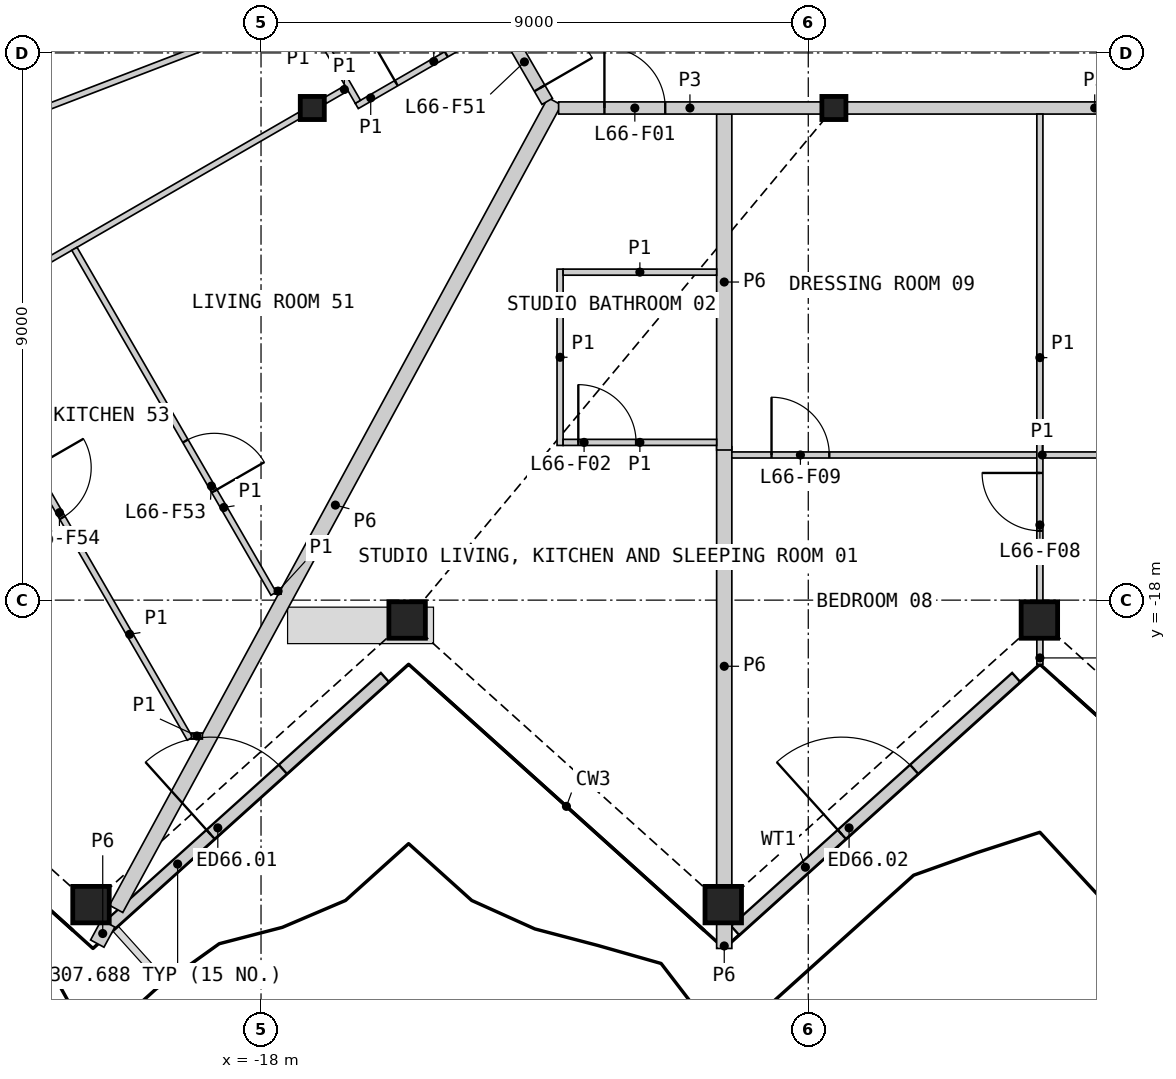
"""IFC4 building model, lengths in metres.
Left out: names, types, materials, properties, quantities, classifications, styles, units other than length and angle.
Written with IfcOpenShell. Run it as: python <this file> out.ifc"""

import sys

from ifc_helpers import new_model, si_unit, direction, frame, frame_2d, origin, origin_2d, place, context, subcontext, project, spatial, rectangle, hollow_rectangle, i_section, extrude, element, fill, save


model = new_model("IFC4")
c1 = context("Model", 3, precision=1e-05, world=origin(), true_north=direction((0.0, 1.0)))
c2 = subcontext(c1, "Body", "Model", "MODEL_VIEW")
j1 = project(units=[si_unit("LENGTHUNIT", "METRE"), si_unit("PLANEANGLEUNIT", "RADIAN")], contexts=[c1])
p1 = place(None, origin())
s1 = spatial("IfcSite", under=j1, at=p1, CompositionType="ELEMENT")
p2 = place(p1, origin())
s2 = spatial("IfcBuilding", under=s1, at=p2, CompositionType="ELEMENT")
p3 = place(p2, frame((0.0, 0.0, 305.2)))
s3 = spatial("IfcBuildingStorey", under=s2, at=p3, CompositionType="ELEMENT", Elevation=305.2)
for number, where, z_axis, x_axis in (
    (1, (-20.796, -23.008, 0.0), (0.0, 0.0, 1.0), (1.0, 0.0, 0.0)),
    (2, (-15.597, -18.327, 0.0), (0.0, 0.0, 1.0), (1.0, 0.0, 0.0)),
    (3, (-10.398, -23.008, 0.0), (0.0, 0.0, 1.0), (1.0, 0.0, 0.0)),
    (4, (-5.199, -18.327, 0.0), (0.0, 0.0, 1.0), (1.0, 0.0, 0.0)),
):
    element("IfcColumn", number, at=place(p3, frame(where, z_axis=z_axis, x_axis=x_axis)), inside=s3, PredefinedType="COLUMN", context=c2, shape_type="SweptSolid", body=[
        extrude(hollow_rectangle(XDim=0.6, YDim=0.6, WallThickness=0.04, at=origin_2d()), origin(), (0.0, 0.0, 1.0), 3.4),
    ])
for number, where, z_axis, x_axis in (
    (5, (-17.157, -9.906, 0.0), (0.0, 0.0, 1.0), (1.0, 0.0, 0.0)),
    (6, (-8.578, -9.906, 0.0), (0.0, 0.0, 1.0), (1.0, 0.0, 0.0)),
):
    element("IfcColumn", number, at=place(p3, frame(where, z_axis=z_axis, x_axis=x_axis)), inside=s3, PredefinedType="COLUMN", context=c2, shape_type="SweptSolid", body=[
        extrude(i_section(OverallWidth=0.396, OverallDepth=0.381, WebThickness=0.019, FlangeThickness=0.03, at=origin_2d()), origin(), (0.0, 0.0, 1.0), 3.4),
    ])
p4 = place(p3, frame((-20.508, -23.364, 0.0), z_axis=(0.0, 0.0, 1.0), x_axis=(0.743135364919, 0.669141113224, 0.0)))
e7 = element("IfcWall", 7, at=p4, inside=s3, PredefinedType="SOLIDWALL", context=c2, shape_type="SweptSolid", body=[
    extrude(rectangle(XDim=6.117, YDim=0.2, at=frame_2d((3.059, 0.0))), origin(), (0.0, 0.0, 1.0), 2.488),
])
p5 = place(p4, frame((2.259, 0.0, 0.0)))
e8 = element("IfcOpeningElement", 8, at=p5, cuts=e7, PredefinedType="OPENING", context=c2, shape_type="SweptSolid", body=[
    extrude(rectangle(XDim=1.6, YDim=2.25, at=frame_2d((0.8, 1.125))), frame((0.0, 0.11, 0.0), z_axis=(0.0, -1.0, 0.0), x_axis=(1.0, 0.0, 0.0)), (0.0, 0.0, 1.0), 0.22),
])
p6 = place(p3, frame((-10.203, -23.434, 0.0), z_axis=(0.0, 0.0, 1.0), x_axis=(0.74314582041, 0.669129501373, 0.0)))
e9 = element("IfcWall", 9, at=p6, inside=s3, PredefinedType="SOLIDWALL", context=c2, shape_type="SweptSolid", body=[
    extrude(rectangle(XDim=6.221, YDim=0.2, at=frame_2d((3.11, 0.0))), origin(), (0.0, 0.0, 1.0), 2.488),
])
p7 = place(p6, frame((2.362, 0.0, 0.0)))
e10 = element("IfcOpeningElement", 10, at=p7, cuts=e9, PredefinedType="OPENING", context=c2, shape_type="SweptSolid", body=[
    extrude(rectangle(XDim=1.6, YDim=2.25, at=frame_2d((0.8, 1.125))), frame((0.0, 0.11, 0.0), z_axis=(0.0, -1.0, 0.0), x_axis=(1.0, 0.0, 0.0)), (0.0, 0.0, 1.0), 0.22),
])
p8 = place(p3, frame((-20.383, -23.078, 0.0), z_axis=(0.0, 0.0, 1.0), x_axis=(0.477177412766, 0.878806984921, 0.0)))
e11 = element("IfcWall", 11, at=p8, inside=s3, PredefinedType="PARTITIONING", context=c2, shape_type="SweptSolid", body=[
    extrude(rectangle(XDim=15.114, YDim=0.25, at=frame_2d((7.557, 0.0))), origin(), (0.0, 0.0, 1.0), 2.33),
])
p9 = place(p3, frame((-8.371, -9.906, 0.0), z_axis=(0.0, 0.0, 1.0), x_axis=(1.0, 0.0, 0.0)))
e12 = element("IfcWall", 12, at=p9, inside=s3, PredefinedType="PARTITIONING", context=c2, shape_type="SweptSolid", body=[
    extrude(rectangle(XDim=8.163, YDim=0.2, at=frame_2d((4.082, 0.0))), origin(), (0.0, 0.0, 1.0), 3.1),
])
p10 = place(p3, frame((-10.382, -22.698, 0.0), z_axis=(0.0, 0.0, 1.0), x_axis=(0.0, 1.0, 0.0)))
e13 = element("IfcWall", 13, at=p10, inside=s3, PredefinedType="PARTITIONING", context=c2, shape_type="SweptSolid", body=[
    extrude(rectangle(XDim=7.22, YDim=0.25, at=frame_2d((3.61, 0.0))), origin(), (0.0, 0.0, 1.0), 2.33),
])
p11 = place(p3, frame((-10.382, -15.531, 0.0), z_axis=(0.0, 0.0, 1.0), x_axis=(0.0, 1.0, 0.0)))
e14 = element("IfcWall", 14, at=p11, inside=s3, PredefinedType="PARTITIONING", context=c2, shape_type="SweptSolid", body=[
    extrude(rectangle(XDim=5.525, YDim=0.25, at=frame_2d((2.762, 0.0))), origin(), (0.0, 0.0, 1.0), 2.33),
])
p12 = place(p3, frame((-13.106, -9.906, 0.0), z_axis=(0.0, 0.0, 1.0), x_axis=(1.0, 0.0, 0.0)))
e15 = element("IfcWall", 15, at=p12, inside=s3, PredefinedType="PARTITIONING", context=c2, shape_type="SweptSolid", body=[
    extrude(rectangle(XDim=4.32, YDim=0.2, at=frame_2d((2.16, 0.0))), origin(), (0.0, 0.0, 1.0), 3.1),
])
p13 = place(p12, frame((0.753, 0.0, 0.0)))
e16 = element("IfcOpeningElement", 16, at=p13, cuts=e15, PredefinedType="OPENING", context=c2, shape_type="SweptSolid", body=[
    extrude(rectangle(XDim=1.0, YDim=2.1, at=frame_2d((0.5, 1.05))), frame((0.0, 0.11, 0.0), z_axis=(0.0, -1.0, 0.0), x_axis=(1.0, 0.0, 0.0)), (0.0, 0.0, 1.0), 0.22),
])
p14 = place(p3, frame((-15.131, -6.614, 0.0), z_axis=(0.0, 0.0, 1.0), x_axis=(0.499967746641, -0.866044024469, 0.0)))
e17 = element("IfcWall", 17, at=p14, inside=s3, PredefinedType="PARTITIONING", context=c2, shape_type="SweptSolid", body=[
    extrude(rectangle(XDim=3.676, YDim=0.2, at=frame_2d((1.838, 0.0))), origin(), (0.0, 0.0, 1.0), 3.1),
])
p15 = place(p14, frame((2.426, 0.0, 0.0)))
e18 = element("IfcOpeningElement", 18, at=p15, cuts=e17, PredefinedType="OPENING", context=c2, shape_type="SweptSolid", body=[
    extrude(rectangle(XDim=1.0, YDim=2.1, at=frame_2d((0.5, 1.05))), frame((0.0, 0.11, 0.0), z_axis=(0.0, -1.0, 0.0), x_axis=(1.0, 0.0, 0.0)), (0.0, 0.0, 1.0), 0.22),
])
p16 = place(p3, frame((-10.382, -23.729, 0.0), z_axis=(0.0, 0.0, 1.0), x_axis=(0.0, 1.0, 0.0)))
e19 = element("IfcWall", 19, at=p16, inside=s3, PredefinedType="PARTITIONING", context=c2, shape_type="SweptSolid", body=[
    extrude(rectangle(XDim=0.411, YDim=0.25, at=frame_2d((0.206, 0.0))), origin(), (0.0, 0.0, 1.0), 2.33),
])
p17 = place(p3, frame((-20.693, -23.649, 0.0), z_axis=(0.0, 0.0, 1.0), x_axis=(0.477077538769, 0.878861207474, 0.0)))
e20 = element("IfcWall", 20, at=p17, inside=s3, PredefinedType="PARTITIONING", context=c2, shape_type="SweptSolid", body=[
    extrude(rectangle(XDim=0.376, YDim=0.25, at=frame_2d((0.188, 0.0))), origin(), (0.0, 0.0, 1.0), 2.33),
])
p18 = place(p3, frame((-29.479, -12.95, 0.0), z_axis=(0.0, 0.0, 1.0), x_axis=(0.933581523131, 0.358365092703, 0.0)))
e21 = element("IfcWall", 21, at=p18, inside=s3, PredefinedType="PARTITIONING", context=c2, shape_type="SweptSolid", body=[
    extrude(rectangle(XDim=13.005, YDim=0.1, at=frame_2d((6.502, 0.0))), origin(), (0.0, 0.0, 1.0), 2.33),
])
p19 = place(p18, frame((4.771, 0.0, 0.0)))
e22 = element("IfcOpeningElement", 22, at=p19, cuts=e21, PredefinedType="OPENING", context=c2, shape_type="SweptSolid", body=[
    extrude(rectangle(XDim=0.95, YDim=2.1, at=frame_2d((0.475, 1.05))), frame((0.0, 0.06, 0.0), z_axis=(0.0, -1.0, 0.0), x_axis=(1.0, 0.0, 0.0)), (0.0, 0.0, 1.0), 0.12),
])
p20 = place(p3, frame((-27.122, -15.659, 0.0), z_axis=(0.0, 0.0, 1.0), x_axis=(0.866021046153, 0.500007547564, 0.0)))
e23 = element("IfcWall", 23, at=p20, inside=s3, PredefinedType="PARTITIONING", context=c2, shape_type="SweptSolid", body=[
    extrude(rectangle(XDim=11.267, YDim=0.1, at=frame_2d((5.634, 0.0))), origin(), (0.0, 0.0, 1.0), 2.33),
])
p21 = place(p20, frame((1.452, 0.0, 0.0)))
e24 = element("IfcOpeningElement", 24, at=p21, cuts=e23, PredefinedType="OPENING", context=c2, shape_type="SweptSolid", body=[
    extrude(rectangle(XDim=0.95, YDim=2.1, at=frame_2d((0.475, 1.05))), frame((0.0, 0.06, 0.0), z_axis=(0.0, -1.0, 0.0), x_axis=(1.0, 0.0, 0.0)), (0.0, 0.0, 1.0), 0.12),
])
p22 = place(p3, frame((-10.257, -15.613, 0.0), z_axis=(0.0, 0.0, 1.0), x_axis=(1.0, 0.0, 0.0)))
e25 = element("IfcWall", 25, at=p22, inside=s3, PredefinedType="PARTITIONING", context=c2, shape_type="SweptSolid", body=[
    extrude(rectangle(XDim=10.207, YDim=0.1, at=frame_2d((5.104, 0.0))), origin(), (0.0, 0.0, 1.0), 2.33),
])
p23 = place(p22, frame((8.403, 0.0, 0.0)))
e26 = element("IfcOpeningElement", 26, at=p23, cuts=e25, PredefinedType="OPENING", context=c2, shape_type="SweptSolid", body=[
    extrude(rectangle(XDim=0.95, YDim=2.1, at=frame_2d((0.475, 1.05))), frame((0.0, 0.06, 0.0), z_axis=(0.0, -1.0, 0.0), x_axis=(1.0, 0.0, 0.0)), (0.0, 0.0, 1.0), 0.12),
])
p24 = place(p22, frame((0.653, 0.0, 0.0)))
e27 = element("IfcOpeningElement", 27, at=p24, cuts=e25, PredefinedType="OPENING", context=c2, shape_type="SweptSolid", body=[
    extrude(rectangle(XDim=0.95, YDim=2.1, at=frame_2d((0.475, 1.05))), frame((0.0, 0.06, 0.0), z_axis=(0.0, -1.0, 0.0), x_axis=(1.0, 0.0, 0.0)), (0.0, 0.0, 1.0), 0.12),
])
p25 = place(p3, frame((-5.191, -18.017, 0.0), z_axis=(0.0, 0.0, 1.0), x_axis=(0.0, 1.0, 0.0)))
e28 = element("IfcWall", 28, at=p25, inside=s3, PredefinedType="PARTITIONING", context=c2, shape_type="SweptSolid", body=[
    extrude(rectangle(XDim=8.011, YDim=0.1, at=frame_2d((4.006, 0.0))), origin(), (0.0, 0.0, 1.0), 2.33),
])
p26 = place(p25, frame((1.158, 0.0, 0.0)))
e29 = element("IfcOpeningElement", 29, at=p26, cuts=e28, PredefinedType="OPENING", context=c2, shape_type="SweptSolid", body=[
    extrude(rectangle(XDim=0.95, YDim=2.1, at=frame_2d((0.475, 1.05))), frame((0.0, 0.06, 0.0), z_axis=(0.0, -1.0, 0.0), x_axis=(1.0, 0.0, 0.0)), (0.0, 0.0, 1.0), 0.12),
])
p27 = place(p3, frame((-23.133, -13.414, 0.0), z_axis=(0.0, 0.0, 1.0), x_axis=(0.500014841469, -0.866016834889, 0.0)))
e30 = element("IfcWall", 30, at=p27, inside=s3, PredefinedType="PARTITIONING", context=c2, shape_type="SweptSolid", body=[
    extrude(rectangle(XDim=7.927, YDim=0.1, at=frame_2d((3.963, 0.0))), origin(), (0.0, 0.0, 1.0), 2.33),
])
p28 = place(p27, frame((2.78, 0.0, 0.0)))
e31 = element("IfcOpeningElement", 31, at=p28, cuts=e30, PredefinedType="OPENING", context=c2, shape_type="SweptSolid", body=[
    extrude(rectangle(XDim=0.95, YDim=2.1, at=frame_2d((0.475, 1.05))), frame((0.0, 0.06, 0.0), z_axis=(0.0, -1.0, 0.0), x_axis=(1.0, 0.0, 0.0)), (0.0, 0.0, 1.0), 0.12),
])
p29 = place(p3, frame((-21.069, -12.222, 0.0), z_axis=(0.0, 0.0, 1.0), x_axis=(0.499991310556, -0.866030420579, 0.0)))
e32 = element("IfcWall", 32, at=p29, inside=s3, PredefinedType="PARTITIONING", context=c2, shape_type="SweptSolid", body=[
    extrude(rectangle(XDim=6.55, YDim=0.1, at=frame_2d((3.275, 0.0))), origin(), (0.0, 0.0, 1.0), 2.33),
])
p30 = place(p29, frame((3.65, 0.0, 0.0)))
e33 = element("IfcOpeningElement", 33, at=p30, cuts=e32, PredefinedType="OPENING", context=c2, shape_type="SweptSolid", body=[
    extrude(rectangle(XDim=0.95, YDim=2.1, at=frame_2d((0.475, 1.05))), frame((0.0, 0.06, 0.0), z_axis=(0.0, -1.0, 0.0), x_axis=(1.0, 0.0, 0.0)), (0.0, 0.0, 1.0), 0.12),
])
p31 = place(p3, frame((-13.082, -15.456, 0.0), z_axis=(0.0, 0.0, 1.0), x_axis=(0.0, 1.0, 0.0)))
e34 = element("IfcWall", 34, at=p31, inside=s3, PredefinedType="PARTITIONING", context=c2, shape_type="SweptSolid", body=[
    extrude(rectangle(XDim=2.9, YDim=0.1, at=frame_2d((1.45, 0.0))), origin(), (0.0, 0.0, 1.0), 2.33),
])
p32 = place(p3, frame((-16.426, -9.872, 0.0), z_axis=(0.0, 0.0, 1.0), x_axis=(0.866029095148, 0.499993606316, 0.0)))
e35 = element("IfcWall", 35, at=p32, inside=s3, PredefinedType="PARTITIONING", context=c2, shape_type="SweptSolid", body=[
    extrude(rectangle(XDim=2.65, YDim=0.1, at=frame_2d((1.325, 0.0))), origin(), (0.0, 0.0, 1.0), 2.33),
])
p33 = place(p32, frame((0.75, 0.0, 0.0)))
e36 = element("IfcOpeningElement", 36, at=p33, cuts=e35, PredefinedType="OPENING", context=c2, shape_type="SweptSolid", body=[
    extrude(rectangle(XDim=0.95, YDim=2.1, at=frame_2d((0.475, 1.05))), frame((0.0, 0.06, 0.0), z_axis=(0.0, -1.0, 0.0), x_axis=(1.0, 0.0, 0.0)), (0.0, 0.0, 1.0), 0.12),
])
p34 = place(p3, frame((-13.032, -12.606, 0.0), z_axis=(0.0, 0.0, 1.0), x_axis=(1.0, 0.0, 0.0)))
e37 = element("IfcWall", 37, at=p34, inside=s3, PredefinedType="PARTITIONING", context=c2, shape_type="SweptSolid", body=[
    extrude(rectangle(XDim=2.525, YDim=0.1, at=frame_2d((1.263, 0.0))), origin(), (0.0, 0.0, 1.0), 2.33),
])
p35 = place(p3, frame((-13.032, -15.406, 0.0), z_axis=(0.0, 0.0, 1.0), x_axis=(1.0, 0.0, 0.0)))
e38 = element("IfcWall", 38, at=p35, inside=s3, PredefinedType="PARTITIONING", context=c2, shape_type="SweptSolid", body=[
    extrude(rectangle(XDim=2.525, YDim=0.1, at=frame_2d((1.263, 0.0))), origin(), (0.0, 0.0, 1.0), 2.33),
])
p36 = place(p35, frame((0.25, 0.0, 0.0)))
e39 = element("IfcOpeningElement", 39, at=p36, cuts=e38, PredefinedType="OPENING", context=c2, shape_type="SweptSolid", body=[
    extrude(rectangle(XDim=0.95, YDim=2.1, at=frame_2d((0.475, 1.05))), frame((0.0, 0.06, 0.0), z_axis=(0.0, -1.0, 0.0), x_axis=(1.0, 0.0, 0.0)), (0.0, 0.0, 1.0), 0.12),
])
p37 = place(p3, frame((-17.507, -7.899, 0.0), z_axis=(0.0, 0.0, 1.0), x_axis=(0.499946605688, -0.86605622881, 0.0)))
e40 = element("IfcWall", 40, at=p37, inside=s3, PredefinedType="PARTITIONING", context=c2, shape_type="SweptSolid", body=[
    extrude(rectangle(XDim=2.2, YDim=0.1, at=frame_2d((1.1, 0.0))), origin(), (0.0, 0.0, 1.0), 2.33),
])
p38 = place(p3, frame((-16.949, -9.786, 0.0), z_axis=(0.0, 0.0, 1.0), x_axis=(0.866036909293, 0.499980071345, 0.0)))
e41 = element("IfcWall", 41, at=p38, inside=s3, PredefinedType="PARTITIONING", context=c2, shape_type="SweptSolid", body=[
    extrude(rectangle(XDim=0.41, YDim=0.1, at=frame_2d((0.205, 0.0))), origin(), (0.0, 0.0, 1.0), 2.33),
])
p39 = place(p3, frame((-5.191, -19.055, 0.0), z_axis=(0.0, 0.0, 1.0), x_axis=(0.0, 1.0, 0.0)))
e42 = element("IfcWall", 42, at=p39, inside=s3, PredefinedType="PARTITIONING", context=c2, shape_type="SweptSolid", body=[
    extrude(rectangle(XDim=0.418, YDim=0.1, at=frame_2d((0.209, 0.0))), origin(), (0.0, 0.0, 1.0), 2.33),
])
p40 = place(p3, frame((-19.145, -20.235, 0.0), z_axis=(0.0, 0.0, 1.0), x_axis=(1.0, 0.0, 0.0)))
e43 = element("IfcWall", 43, at=p40, inside=s3, PredefinedType="PARTITIONING", context=c2, shape_type="SweptSolid", body=[
    extrude(rectangle(XDim=0.18, YDim=0.1, at=frame_2d((0.09, 0.0))), origin(), (0.0, 0.0, 1.0), 2.33),
])
p41 = place(p3, frame((-17.769, -17.852, 0.0), z_axis=(0.0, 0.0, 1.0), x_axis=(1.0, 0.0, 0.0)))
e44 = element("IfcWall", 44, at=p41, inside=s3, PredefinedType="PARTITIONING", context=c2, shape_type="SweptSolid", body=[
    extrude(rectangle(XDim=0.098, YDim=0.1, at=frame_2d((0.049, 0.0))), origin(), (0.0, 0.0, 1.0), 2.33),
])
p42 = place(p5, origin())
e45 = element("IfcDoor", 45, at=p42, inside=s3, OperationType="DOUBLE_DOOR_SINGLE_SWING", PredefinedType="DOOR", context=c2, shape_type="SweptSolid", body=[
    extrude(rectangle(XDim=1.6, YDim=2.25, at=frame_2d((0.8, 1.125))), frame((0.0, 0.025, 0.0), z_axis=(0.0, -1.0, 0.0), x_axis=(1.0, 0.0, 0.0)), (0.0, 0.0, 1.0), 0.05),
])
fill(e8, e45)
p43 = place(p7, origin())
e46 = element("IfcDoor", 46, at=p43, inside=s3, OperationType="DOUBLE_DOOR_SINGLE_SWING", PredefinedType="DOOR", context=c2, shape_type="SweptSolid", body=[
    extrude(rectangle(XDim=1.6, YDim=2.25, at=frame_2d((0.8, 1.125))), frame((0.0, 0.025, 0.0), z_axis=(0.0, -1.0, 0.0), x_axis=(1.0, 0.0, 0.0)), (0.0, 0.0, 1.0), 0.05),
])
fill(e10, e46)
p44 = place(p13, origin())
e47 = element("IfcDoor", 47, at=p44, inside=s3, OperationType="SINGLE_SWING_LEFT", PredefinedType="DOOR", context=c2, shape_type="SweptSolid", body=[
    extrude(rectangle(XDim=1.0, YDim=2.1, at=frame_2d((0.5, 1.05))), frame((0.0, 0.025, 0.0), z_axis=(0.0, -1.0, 0.0), x_axis=(1.0, 0.0, 0.0)), (0.0, 0.0, 1.0), 0.05),
])
fill(e16, e47)
p45 = place(p36, origin())
e48 = element("IfcDoor", 48, at=p45, inside=s3, OperationType="SINGLE_SWING_LEFT", PredefinedType="DOOR", context=c2, shape_type="SweptSolid", body=[
    extrude(rectangle(XDim=0.95, YDim=2.1, at=frame_2d((0.475, 1.05))), frame((0.0, 0.025, 0.0), z_axis=(0.0, -1.0, 0.0), x_axis=(1.0, 0.0, 0.0)), (0.0, 0.0, 1.0), 0.05),
])
fill(e39, e48)
p46 = place(p26, origin())
e49 = element("IfcDoor", 49, at=p46, inside=s3, OperationType="SINGLE_SWING_RIGHT", PredefinedType="DOOR", context=c2, shape_type="SweptSolid", body=[
    extrude(rectangle(XDim=0.95, YDim=2.1, at=frame_2d((0.475, 1.05))), frame((0.0, 0.025, 0.0), z_axis=(0.0, -1.0, 0.0), x_axis=(1.0, 0.0, 0.0)), (0.0, 0.0, 1.0), 0.05),
])
fill(e29, e49)
p47 = place(p24, origin())
e50 = element("IfcDoor", 50, at=p47, inside=s3, OperationType="SINGLE_SWING_LEFT", PredefinedType="DOOR", context=c2, shape_type="SweptSolid", body=[
    extrude(rectangle(XDim=0.95, YDim=2.1, at=frame_2d((0.475, 1.05))), frame((0.0, 0.025, 0.0), z_axis=(0.0, -1.0, 0.0), x_axis=(1.0, 0.0, 0.0)), (0.0, 0.0, 1.0), 0.05),
])
fill(e27, e50)
p48 = place(p15, origin())
e51 = element("IfcDoor", 51, at=p48, inside=s3, OperationType="SINGLE_SWING_RIGHT", PredefinedType="DOOR", context=c2, shape_type="SweptSolid", body=[
    extrude(rectangle(XDim=1.0, YDim=2.1, at=frame_2d((0.5, 1.05))), frame((0.0, 0.025, 0.0), z_axis=(0.0, -1.0, 0.0), x_axis=(1.0, 0.0, 0.0)), (0.0, 0.0, 1.0), 0.05),
])
fill(e18, e51)
p49 = place(p33, origin())
e52 = element("IfcDoor", 52, at=p49, inside=s3, OperationType="SINGLE_SWING_LEFT", PredefinedType="DOOR", context=c2, shape_type="SweptSolid", body=[
    extrude(rectangle(XDim=0.95, YDim=2.1, at=frame_2d((0.475, 1.05))), frame((0.0, 0.025, 0.0), z_axis=(0.0, -1.0, 0.0), x_axis=(1.0, 0.0, 0.0)), (0.0, 0.0, 1.0), 0.05),
])
fill(e36, e52)
p50 = place(p30, origin())
e53 = element("IfcDoor", 53, at=p50, inside=s3, OperationType="SINGLE_SWING_RIGHT", PredefinedType="DOOR", context=c2, shape_type="SweptSolid", body=[
    extrude(rectangle(XDim=0.95, YDim=2.1, at=frame_2d((0.475, 1.05))), frame((0.0, 0.025, 0.0), z_axis=(0.0, -1.0, 0.0), x_axis=(1.0, 0.0, 0.0)), (0.0, 0.0, 1.0), 0.05),
])
fill(e33, e53)
p51 = place(p28, origin())
e54 = element("IfcDoor", 54, at=p51, inside=s3, OperationType="SINGLE_SWING_LEFT", PredefinedType="DOOR", context=c2, shape_type="SweptSolid", body=[
    extrude(rectangle(XDim=0.95, YDim=2.1, at=frame_2d((0.475, 1.05))), frame((0.0, 0.025, 0.0), z_axis=(0.0, -1.0, 0.0), x_axis=(1.0, 0.0, 0.0)), (0.0, 0.0, 1.0), 0.05),
])
fill(e31, e54)
save(model, sys.argv[1])
